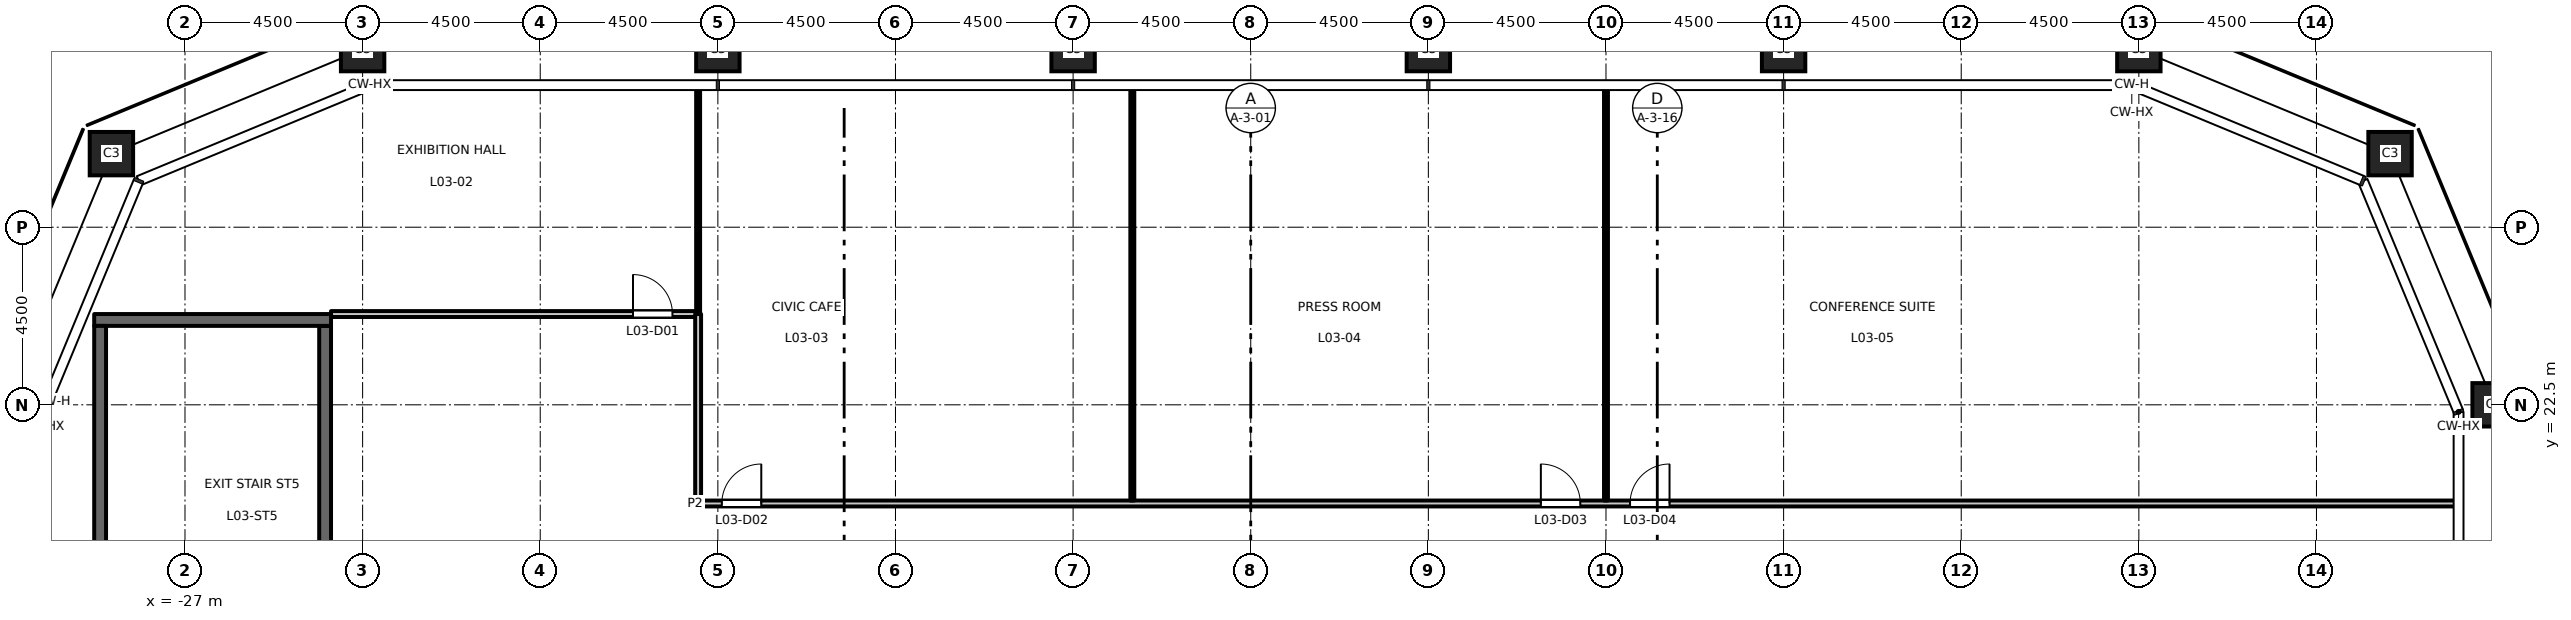
"""IFC4 building model, lengths in metres.
Left out: names, types, materials, properties, quantities, classifications, styles, units other than length and angle.
Written with IfcOpenShell. Run it as: python <this file> out.ifc"""

import sys

from ifc_helpers import new_model, si_unit, direction, frame, frame_2d, origin, origin_2d, place, context, subcontext, project, spatial, rectangle, hollow_rectangle, extrude, element, fill, save


model = new_model("IFC4")
c1 = context("Model", 3, precision=1e-05, world=origin(), true_north=direction((0.0, 1.0)))
c2 = subcontext(c1, "Body", "Model", "MODEL_VIEW")
j1 = project(units=[si_unit("LENGTHUNIT", "METRE"), si_unit("PLANEANGLEUNIT", "RADIAN")], contexts=[c1])
p1 = place(None, origin())
s1 = spatial("IfcSite", under=j1, at=p1, CompositionType="ELEMENT")
p2 = place(p1, origin())
s2 = spatial("IfcBuilding", under=s1, at=p2, CompositionType="ELEMENT")
p3 = place(p2, frame((0.0, 0.0, 17.2)))
s3 = spatial("IfcBuildingStorey", under=s2, at=p3, CompositionType="ELEMENT", Elevation=17.2)
for number, where, z_axis, x_axis in (
    (1, (31.5, 22.5, 0.0), (0.0, 0.0, 1.0), (1.0, 0.0, 0.0)),
    (2, (28.864, 28.864, 0.0), (0.0, 0.0, 1.0), (1.0, 0.0, 0.0)),
    (3, (22.5, 31.5, 0.0), (0.0, 0.0, 1.0), (1.0, 0.0, 0.0)),
    (4, (13.5, 31.5, 0.0), (0.0, 0.0, 1.0), (1.0, 0.0, 0.0)),
    (5, (4.5, 31.5, 0.0), (0.0, 0.0, 1.0), (1.0, 0.0, 0.0)),
    (6, (-4.5, 31.5, 0.0), (0.0, 0.0, 1.0), (1.0, 0.0, 0.0)),
    (7, (-13.5, 31.5, 0.0), (0.0, 0.0, 1.0), (1.0, 0.0, 0.0)),
    (8, (-22.5, 31.5, 0.0), (0.0, 0.0, 1.0), (1.0, 0.0, 0.0)),
    (9, (-28.864, 28.864, 0.0), (0.0, 0.0, 1.0), (1.0, 0.0, 0.0)),
):
    element("IfcColumn", number, at=place(p3, frame(where, z_axis=z_axis, x_axis=x_axis)), inside=s3, PredefinedType="COLUMN", context=c2, shape_type="SweptSolid", body=[
        extrude(hollow_rectangle(XDim=1.1, YDim=1.1, WallThickness=0.07, at=origin_2d()), origin(), (0.0, 0.0, 1.0), 5.0),
    ])
p4 = place(p3, frame((-23.45, 14.3, 0.0), z_axis=(0.0, 0.0, 1.0), x_axis=(0.0, 1.0, 0.0)))
e10 = element("IfcWall", 10, at=p4, inside=s3, PredefinedType="SHEAR", context=c2, shape_type="SweptSolid", body=[
    extrude(rectangle(XDim=10.2, YDim=0.3, at=frame_2d((5.1, 0.0))), origin(), (0.0, 0.0, 1.0), 4.85),
])
p5 = place(p4, frame((0.2, 0.0, 0.0)))
e11 = element("IfcOpeningElement", 11, at=p5, cuts=e10, PredefinedType="OPENING", context=c2, shape_type="SweptSolid", body=[
    extrude(rectangle(XDim=1.8, YDim=2.1, at=frame_2d((0.9, 1.05))), frame((0.0, 0.16, 0.0), z_axis=(0.0, -1.0, 0.0), x_axis=(1.0, 0.0, 0.0)), (0.0, 0.0, 1.0), 0.32),
])
p6 = place(p3, frame((-29.3, 24.65, 0.0), z_axis=(0.0, 0.0, 1.0), x_axis=(1.0, 0.0, 0.0)))
e12 = element("IfcWall", 12, at=p6, inside=s3, PredefinedType="SHEAR", context=c2, shape_type="SweptSolid", body=[
    extrude(rectangle(XDim=6.0, YDim=0.3, at=frame_2d((3.0, 0.0))), origin(), (0.0, 0.0, 1.0), 4.85),
])
p7 = place(p3, frame((-29.15, 14.3, 0.0), z_axis=(0.0, 0.0, 1.0), x_axis=(0.0, 1.0, 0.0)))
e13 = element("IfcWall", 13, at=p7, inside=s3, PredefinedType="SHEAR", context=c2, shape_type="SweptSolid", body=[
    extrude(rectangle(XDim=10.2, YDim=0.3, at=frame_2d((5.1, 0.0))), origin(), (0.0, 0.0, 1.0), 4.85),
])
p8 = place(p3, frame((-14.075, 20.0, 0.0), z_axis=(0.0, 0.0, 1.0), x_axis=(1.0, 0.0, 0.0)))
e14 = element("IfcWall", 14, at=p8, inside=s3, PredefinedType="PARTITIONING", context=c2, shape_type="SweptSolid", body=[
    extrude(rectangle(XDim=44.585, YDim=0.15, at=frame_2d((22.292, 0.0))), origin(), (0.0, 0.0, 1.0), 4.85),
])
p9 = place(p8, frame((0.675, 0.0, 0.0)))
e15 = element("IfcOpeningElement", 15, at=p9, cuts=e14, PredefinedType="OPENING", context=c2, shape_type="SweptSolid", body=[
    extrude(rectangle(XDim=1.0, YDim=2.1, at=frame_2d((0.5, 1.05))), frame((0.0, 0.085, 0.0), z_axis=(0.0, -1.0, 0.0), x_axis=(1.0, 0.0, 0.0)), (0.0, 0.0, 1.0), 0.17),
])
p10 = place(p8, frame((21.425, 0.0, 0.0)))
e16 = element("IfcOpeningElement", 16, at=p10, cuts=e14, PredefinedType="OPENING", context=c2, shape_type="SweptSolid", body=[
    extrude(rectangle(XDim=1.0, YDim=2.1, at=frame_2d((0.5, 1.05))), frame((0.0, 0.085, 0.0), z_axis=(0.0, -1.0, 0.0), x_axis=(1.0, 0.0, 0.0)), (0.0, 0.0, 1.0), 0.17),
])
p11 = place(p8, frame((23.685, 0.0, 0.0)))
e17 = element("IfcOpeningElement", 17, at=p11, cuts=e14, PredefinedType="OPENING", context=c2, shape_type="SweptSolid", body=[
    extrude(rectangle(XDim=1.0, YDim=2.1, at=frame_2d((0.5, 1.05))), frame((0.0, 0.085, 0.0), z_axis=(0.0, -1.0, 0.0), x_axis=(1.0, 0.0, 0.0)), (0.0, 0.0, 1.0), 0.17),
])
p12 = place(p3, frame((-23.3, 24.8, 0.0), z_axis=(0.0, 0.0, 1.0), x_axis=(1.0, 0.0, 0.0)))
e18 = element("IfcWall", 18, at=p12, inside=s3, PredefinedType="PARTITIONING", context=c2, shape_type="SweptSolid", body=[
    extrude(rectangle(XDim=9.25, YDim=0.15, at=frame_2d((4.625, 0.0))), origin(), (0.0, 0.0, 1.0), 4.85),
])
p13 = place(p12, frame((7.65, 0.0, 0.0)))
e19 = element("IfcOpeningElement", 19, at=p13, cuts=e18, PredefinedType="OPENING", context=c2, shape_type="SweptSolid", body=[
    extrude(rectangle(XDim=1.0, YDim=2.1, at=frame_2d((0.5, 1.05))), frame((0.0, 0.085, 0.0), z_axis=(0.0, -1.0, 0.0), x_axis=(1.0, 0.0, 0.0)), (0.0, 0.0, 1.0), 0.17),
])
p14 = place(p3, frame((-14.0, 24.8, 0.0), z_axis=(0.0, 0.0, 1.0), x_axis=(0.0, 1.0, 0.0)))
e20 = element("IfcWall", 20, at=p14, inside=s3, PredefinedType="PARTITIONING", context=c2, shape_type="SweptSolid", body=[
    extrude(rectangle(XDim=5.71, YDim=0.1, at=frame_2d((2.855, 0.0))), origin(), (0.0, 0.0, 1.0), 4.85),
])
p15 = place(p3, frame((-14.0, 20.075, 0.0), z_axis=(0.0, 0.0, 1.0), x_axis=(0.0, 1.0, 0.0)))
e21 = element("IfcWall", 21, at=p15, inside=s3, PredefinedType="PARTITIONING", context=c2, shape_type="SweptSolid", body=[
    extrude(rectangle(XDim=4.725, YDim=0.15, at=frame_2d((2.363, 0.0))), origin(), (0.0, 0.0, 1.0), 4.85),
])
for number, where, z_axis, x_axis in (
    (22, (-3.0, 20.075, 0.0), (0.0, 0.0, 1.0), (0.0, 1.0, 0.0)),
    (23, (9.0, 20.075, 0.0), (0.0, 0.0, 1.0), (0.0, 1.0, 0.0)),
):
    element("IfcWall", number, at=place(p3, frame(where, z_axis=z_axis, x_axis=x_axis)), inside=s3, PredefinedType="PARTITIONING", context=c2, shape_type="SweptSolid", body=[
        extrude(rectangle(XDim=10.435, YDim=0.1, at=frame_2d((5.218, 0.0))), origin(), (0.0, 0.0, 1.0), 4.85),
    ])
p16 = place(p13, origin())
e24 = element("IfcDoor", 24, at=p16, inside=s3, OperationType="SINGLE_SWING_LEFT", PredefinedType="DOOR", context=c2, shape_type="SweptSolid", body=[
    extrude(rectangle(XDim=1.0, YDim=2.1, at=frame_2d((0.5, 1.05))), frame((0.0, 0.025, 0.0), z_axis=(0.0, -1.0, 0.0), x_axis=(1.0, 0.0, 0.0)), (0.0, 0.0, 1.0), 0.05),
])
fill(e19, e24)
p17 = place(p9, origin())
e25 = element("IfcDoor", 25, at=p17, inside=s3, OperationType="SINGLE_SWING_RIGHT", PredefinedType="DOOR", context=c2, shape_type="SweptSolid", body=[
    extrude(rectangle(XDim=1.0, YDim=2.1, at=frame_2d((0.5, 1.05))), frame((0.0, 0.025, 0.0), z_axis=(0.0, -1.0, 0.0), x_axis=(1.0, 0.0, 0.0)), (0.0, 0.0, 1.0), 0.05),
])
fill(e15, e25)
p18 = place(p10, origin())
e26 = element("IfcDoor", 26, at=p18, inside=s3, OperationType="SINGLE_SWING_LEFT", PredefinedType="DOOR", context=c2, shape_type="SweptSolid", body=[
    extrude(rectangle(XDim=1.0, YDim=2.1, at=frame_2d((0.5, 1.05))), frame((0.0, 0.025, 0.0), z_axis=(0.0, -1.0, 0.0), x_axis=(1.0, 0.0, 0.0)), (0.0, 0.0, 1.0), 0.05),
])
fill(e16, e26)
p19 = place(p11, origin())
e27 = element("IfcDoor", 27, at=p19, inside=s3, OperationType="SINGLE_SWING_RIGHT", PredefinedType="DOOR", context=c2, shape_type="SweptSolid", body=[
    extrude(rectangle(XDim=1.0, YDim=2.1, at=frame_2d((0.5, 1.05))), frame((0.0, 0.025, 0.0), z_axis=(0.0, -1.0, 0.0), x_axis=(1.0, 0.0, 0.0)), (0.0, 0.0, 1.0), 0.05),
])
fill(e17, e27)
save(model, sys.argv[1])
